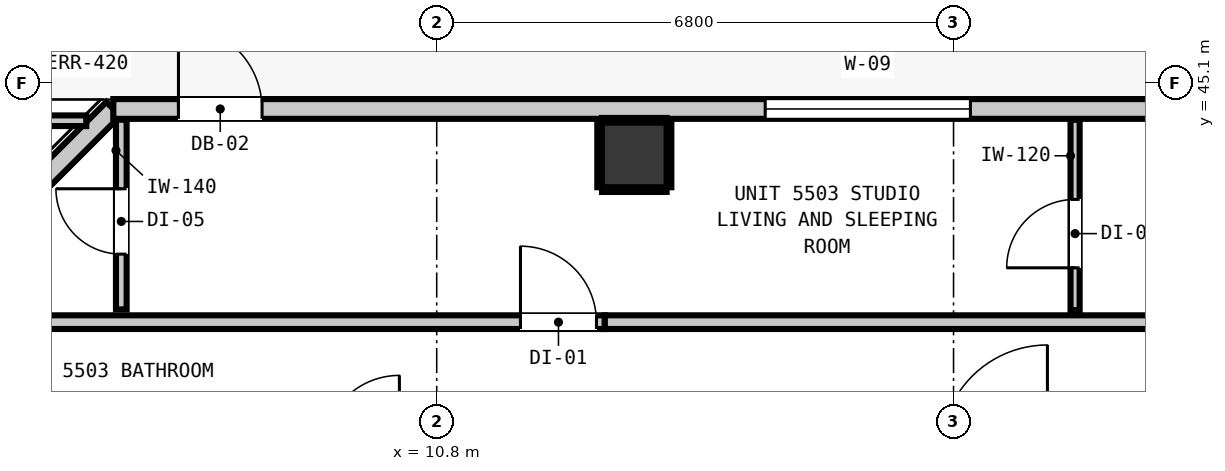
"""IFC4 building model, lengths in metres.
Left out: names, types, materials, properties, quantities, classifications, styles, units other than length and angle.
Written with IfcOpenShell. Run it as: python <this file> out.ifc"""

import sys

from ifc_helpers import new_model, si_unit, direction, frame, frame_2d, origin, origin_2d, place, context, subcontext, project, spatial, rectangle, extrude, element, fill, save


model = new_model("IFC4")
c1 = context("Model", 3, precision=1e-05, world=origin(), true_north=direction((0.0, 1.0)))
c2 = subcontext(c1, "Body", "Model", "MODEL_VIEW")
j1 = project(units=[si_unit("LENGTHUNIT", "METRE"), si_unit("PLANEANGLEUNIT", "RADIAN")], contexts=[c1])
p1 = place(None, origin())
s1 = spatial("IfcSite", under=j1, at=p1, CompositionType="ELEMENT")
p2 = place(p1, origin())
s2 = spatial("IfcBuilding", under=s1, at=p2, CompositionType="ELEMENT")
p3 = place(p2, frame((0.0, 0.0, 190.16)))
s3 = spatial("IfcBuildingStorey", under=s2, at=p3, CompositionType="ELEMENT", Elevation=190.16)
p4 = place(p3, frame((13.4, 44.15, -0.2), z_axis=(0.0, 0.0, 1.0), x_axis=(1.0, 0.0, 0.0)))
e1 = element("IfcColumn", 1, at=p4, inside=s3, PredefinedType="COLUMN", context=c2, shape_type="SweptSolid", body=[
    extrude(rectangle(XDim=0.85, YDim=0.85, at=origin_2d()), origin(), (0.0, 0.0, 1.0), 3.52),
])
p5 = place(p3, frame((4.445, 42.655, 0.0), z_axis=(0.0, 0.0, 1.0), x_axis=(0.707106781187, 0.707106781187, 0.0)))
e2 = element("IfcWall", 2, at=p5, inside=s3, PredefinedType="STANDARD", context=c2, shape_type="SweptSolid", body=[
    extrude(rectangle(XDim=2.97, YDim=0.26, at=frame_2d((1.485, 0.0))), origin(), (0.0, 0.0, 1.0), 3.1),
])
p6 = place(p3, frame((6.545, 44.755, 0.0), z_axis=(0.0, 0.0, 1.0), x_axis=(1.0, 0.0, 0.0)))
e3 = element("IfcWall", 3, at=p6, inside=s3, PredefinedType="STANDARD", context=c2, shape_type="SweptSolid", body=[
    extrude(rectangle(XDim=32.71, YDim=0.26, at=frame_2d((16.355, 0.0))), origin(), (0.0, 0.0, 1.0), 3.1),
])
p7 = place(p6, frame((0.857, 0.0, 0.0)))
e4 = element("IfcOpeningElement", 4, at=p7, cuts=e3, PredefinedType="OPENING", context=c2, shape_type="SweptSolid", body=[
    extrude(rectangle(XDim=1.1, YDim=2.15, at=frame_2d((0.55, 1.075))), frame((0.0, 0.14, 0.0), z_axis=(0.0, -1.0, 0.0), x_axis=(1.0, 0.0, 0.0)), (0.0, 0.0, 1.0), 0.28),
])
p8 = place(p6, frame((8.577, 0.0, 0.85)))
e5 = element("IfcOpeningElement", 5, at=p8, cuts=e3, PredefinedType="OPENING", context=c2, shape_type="SweptSolid", body=[
    extrude(rectangle(XDim=2.7, YDim=2.0, at=frame_2d((1.35, 1.0))), frame((0.0, 0.14, 0.0), z_axis=(0.0, -1.0, 0.0), x_axis=(1.0, 0.0, 0.0)), (0.0, 0.0, 1.0), 0.28),
])
p9 = place(p6, frame((24.955, 0.0, 0.85)))
e6 = element("IfcOpeningElement", 6, at=p9, cuts=e3, PredefinedType="OPENING", context=c2, shape_type="SweptSolid", body=[
    extrude(rectangle(XDim=2.7, YDim=2.0, at=frame_2d((1.35, 1.0))), frame((0.0, 0.14, 0.0), z_axis=(0.0, -1.0, 0.0), x_axis=(1.0, 0.0, 0.0)), (0.0, 0.0, 1.0), 0.28),
])
p10 = place(p3, frame((5.388, 41.95, 0.0), z_axis=(0.0, 0.0, 1.0), x_axis=(1.0, 0.0, 0.0)))
e7 = element("IfcWall", 7, at=p10, inside=s3, PredefinedType="PARTITIONING", context=c2, shape_type="SweptSolid", body=[
    extrude(rectangle(XDim=7.624, YDim=0.18, at=frame_2d((3.812, 0.0))), origin(), (0.0, 0.0, 1.0), 2.477),
])
p11 = place(p10, frame((6.514, 0.0, 0.0)))
e8 = element("IfcOpeningElement", 8, at=p11, cuts=e7, PredefinedType="OPENING", context=c2, shape_type="SweptSolid", body=[
    extrude(rectangle(XDim=1.0, YDim=2.15, at=frame_2d((0.5, 1.075))), frame((0.0, 0.1, 0.0), z_axis=(0.0, -1.0, 0.0), x_axis=(1.0, 0.0, 0.0)), (0.0, 0.0, 1.0), 0.2),
])
p12 = place(p3, frame((13.012, 41.95, 0.0), z_axis=(0.0, 0.0, 1.0), x_axis=(1.0, 0.0, 0.0)))
e9 = element("IfcWall", 9, at=p12, inside=s3, PredefinedType="PARTITIONING", context=c2, shape_type="SweptSolid", body=[
    extrude(rectangle(XDim=28.201, YDim=0.18, at=frame_2d((14.101, 0.0))), origin(), (0.0, 0.0, 1.0), 3.1),
])
p13 = place(p12, frame((18.783, 0.0, 0.0)))
e10 = element("IfcOpeningElement", 10, at=p13, cuts=e9, PredefinedType="OPENING", context=c2, shape_type="SweptSolid", body=[
    extrude(rectangle(XDim=0.9, YDim=2.1, at=frame_2d((0.45, 1.05))), frame((0.0, 0.1, 0.0), z_axis=(0.0, -1.0, 0.0), x_axis=(1.0, 0.0, 0.0)), (0.0, 0.0, 1.0), 0.2),
])
p14 = place(p3, frame((4.6, 44.6, 0.0), z_axis=(0.0, 0.0, 1.0), x_axis=(1.0, 0.0, 0.0)))
e11 = element("IfcWall", 11, at=p14, inside=s3, PredefinedType="PARTITIONING", context=c2, shape_type="SweptSolid", body=[
    extrude(rectangle(XDim=1.589, YDim=0.14, at=frame_2d((0.794, 0.0))), origin(), (0.0, 0.0, 1.0), 3.1),
])
p15 = place(p3, frame((6.65, 42.118, 0.0), z_axis=(0.0, 0.0, 1.0), x_axis=(0.0, 1.0, 0.0)))
e12 = element("IfcWall", 12, at=p15, inside=s3, PredefinedType="PARTITIONING", context=c2, shape_type="SweptSolid", body=[
    extrude(rectangle(XDim=2.495, YDim=0.14, at=frame_2d((1.248, 0.0))), origin(), (0.0, 0.0, 1.0), 3.1),
])
p16 = place(p15, frame((0.727, 0.0, 0.0)))
e13 = element("IfcOpeningElement", 13, at=p16, cuts=e12, PredefinedType="OPENING", context=c2, shape_type="SweptSolid", body=[
    extrude(rectangle(XDim=0.86, YDim=2.02, at=frame_2d((0.43, 1.01))), frame((0.0, 0.08, 0.0), z_axis=(0.0, -1.0, 0.0), x_axis=(1.0, 0.0, 0.0)), (0.0, 0.0, 1.0), 0.16),
])
p17 = place(p3, frame((19.199, 42.108, 0.0), z_axis=(0.0, 0.0, 1.0), x_axis=(0.0, 1.0, 0.0)))
e14 = element("IfcWall", 14, at=p17, inside=s3, PredefinedType="PARTITIONING", context=c2, shape_type="SweptSolid", body=[
    extrude(rectangle(XDim=2.505, YDim=0.12, at=frame_2d((1.252, 0.0))), origin(), (0.0, 0.0, 1.0), 3.1),
])
p18 = place(p17, frame((0.557, 0.0, 0.0)))
e15 = element("IfcOpeningElement", 15, at=p18, cuts=e14, PredefinedType="OPENING", context=c2, shape_type="SweptSolid", body=[
    extrude(rectangle(XDim=0.9, YDim=2.1, at=frame_2d((0.45, 1.05))), frame((0.0, 0.07, 0.0), z_axis=(0.0, -1.0, 0.0), x_axis=(1.0, 0.0, 0.0)), (0.0, 0.0, 1.0), 0.14),
])
for number, where, z_axis, x_axis in (
    (16, (12.975, 43.693, 0.0), (0.0, 0.0, 1.0), (1.0, 0.0, 0.0)),
    (17, (12.975, 44.607, 0.0), (0.0, 0.0, 1.0), (1.0, 0.0, 0.0)),
    (18, (12.943, 43.725, 0.0), (0.0, 0.0, 1.0), (0.0, 1.0, 0.0)),
    (19, (13.857, 43.725, 0.0), (0.0, 0.0, 1.0), (0.0, 1.0, 0.0)),
):
    element("IfcWall", number, at=place(p3, frame(where, z_axis=z_axis, x_axis=x_axis)), inside=s3, PredefinedType="PARTITIONING", context=c2, shape_type="SweptSolid", body=[
        extrude(rectangle(XDim=0.85, YDim=0.06, at=frame_2d((0.425, 0.0))), origin(), (0.0, 0.0, 1.0), 1.45),
    ])
p19 = place(p7, origin())
e20 = element("IfcDoor", 20, at=p19, inside=s3, OperationType="SINGLE_SWING_LEFT", PredefinedType="DOOR", context=c2, shape_type="SweptSolid", body=[
    extrude(rectangle(XDim=1.1, YDim=2.15, at=frame_2d((0.55, 1.075))), frame((0.0, 0.025, 0.0), z_axis=(0.0, -1.0, 0.0), x_axis=(1.0, 0.0, 0.0)), (0.0, 0.0, 1.0), 0.05),
])
fill(e4, e20)
p20 = place(p8, origin())
e21 = element("IfcWindow", 21, at=p20, inside=s3, PartitioningType="SINGLE_PANEL", PredefinedType="WINDOW", context=c2, shape_type="SweptSolid", body=[
    extrude(rectangle(XDim=2.7, YDim=2.0, at=frame_2d((1.35, 1.0))), frame((0.0, 0.03, 0.0), z_axis=(0.0, -1.0, 0.0), x_axis=(1.0, 0.0, 0.0)), (0.0, 0.0, 1.0), 0.06),
])
fill(e5, e21)
p21 = place(p11, origin())
e22 = element("IfcDoor", 22, at=p21, inside=s3, OperationType="SINGLE_SWING_LEFT", PredefinedType="DOOR", context=c2, shape_type="SweptSolid", body=[
    extrude(rectangle(XDim=1.0, YDim=2.15, at=frame_2d((0.5, 1.075))), frame((0.0, 0.025, 0.0), z_axis=(0.0, -1.0, 0.0), x_axis=(1.0, 0.0, 0.0)), (0.0, 0.0, 1.0), 0.05),
])
fill(e8, e22)
p22 = place(p16, origin())
e23 = element("IfcDoor", 23, at=p22, inside=s3, OperationType="SINGLE_SWING_RIGHT", PredefinedType="DOOR", context=c2, shape_type="SweptSolid", body=[
    extrude(rectangle(XDim=0.86, YDim=2.02, at=frame_2d((0.43, 1.01))), frame((0.0, 0.025, 0.0), z_axis=(0.0, -1.0, 0.0), x_axis=(1.0, 0.0, 0.0)), (0.0, 0.0, 1.0), 0.05),
])
fill(e13, e23)
p23 = place(p18, origin())
e24 = element("IfcDoor", 24, at=p23, inside=s3, OperationType="SINGLE_SWING_LEFT", PredefinedType="DOOR", context=c2, shape_type="SweptSolid", body=[
    extrude(rectangle(XDim=0.9, YDim=2.1, at=frame_2d((0.45, 1.05))), frame((0.0, 0.025, 0.0), z_axis=(0.0, -1.0, 0.0), x_axis=(1.0, 0.0, 0.0)), (0.0, 0.0, 1.0), 0.05),
])
fill(e15, e24)
save(model, sys.argv[1])
